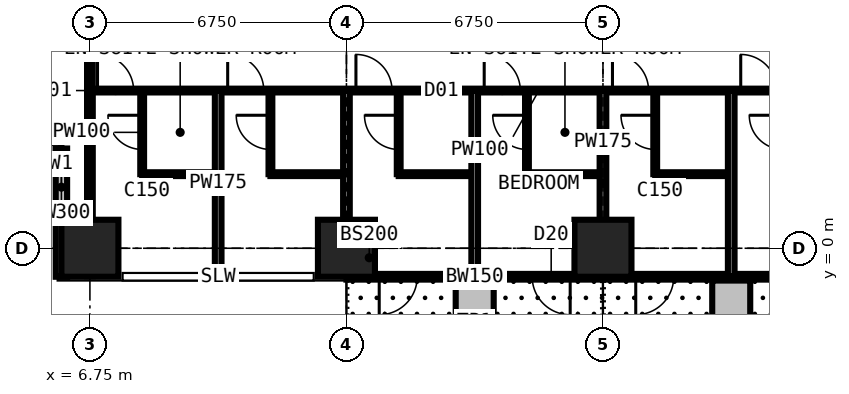
"""IFC4 building model, lengths in metres.
Left out: names, types, materials, properties, quantities, classifications, styles, units other than length and angle.
Written with IfcOpenShell. Run it as: python <this file> out.ifc"""

import sys

from ifc_helpers import new_model, si_unit, direction, frame, frame_2d, origin, origin_2d, place, context, subcontext, project, spatial, rectangle, extrude, element, fill, save


model = new_model("IFC4")
c1 = context("Model", 3, precision=1e-05, world=origin(), true_north=direction((0.0, 1.0)))
c2 = subcontext(c1, "Body", "Model", "MODEL_VIEW")
j1 = project(units=[si_unit("LENGTHUNIT", "METRE"), si_unit("PLANEANGLEUNIT", "RADIAN")], contexts=[c1])
p1 = place(None, origin())
s1 = spatial("IfcSite", under=j1, at=p1, CompositionType="ELEMENT")
p2 = place(p1, origin())
s2 = spatial("IfcBuilding", under=s1, at=p2, CompositionType="ELEMENT")
p3 = place(p2, frame((0.0, 0.0, 108.9)))
s3 = spatial("IfcBuildingStorey", under=s2, at=p3, CompositionType="ELEMENT", Elevation=108.9)
for number, where, z_axis, x_axis in (
    (1, (6.75, 0.0, 0.0), (0.0, 0.0, 1.0), (1.0, 0.0, 0.0)),
    (2, (13.5, 0.0, 0.0), (0.0, 0.0, 1.0), (1.0, 0.0, 0.0)),
    (3, (20.25, 0.0, 0.0), (0.0, 0.0, 1.0), (1.0, 0.0, 0.0)),
):
    element("IfcColumn", number, at=place(p3, frame(where, z_axis=z_axis, x_axis=x_axis)), inside=s3, PredefinedType="COLUMN", context=c2, shape_type="SweptSolid", body=[
        extrude(rectangle(XDim=1.5, YDim=1.5, at=origin_2d()), origin(), (0.0, 0.0, 1.0), 3.6),
    ])
p4 = place(p3, frame((2.625, 2.625, 0.0), z_axis=(0.0, 0.0, 1.0), x_axis=(1.0, 0.0, 0.0)))
e4 = element("IfcWall", 4, at=p4, inside=s3, PredefinedType="SOLIDWALL", context=c2, shape_type="SweptSolid", body=[
    extrude(rectangle(XDim=3.375, YDim=0.3, at=frame_2d((1.688, 0.0))), origin(), (0.0, 0.0, 1.0), 3.375),
])
p5 = place(p4, frame((0.788, 0.0, 0.6)))
e5 = element("IfcOpeningElement", 5, at=p5, cuts=e4, PredefinedType="OPENING", context=c2, shape_type="SweptSolid", body=[
    extrude(rectangle(XDim=1.8, YDim=2.1, at=frame_2d((0.9, 1.05))), frame((0.0, 0.16, 0.0), z_axis=(0.0, -1.0, 0.0), x_axis=(1.0, 0.0, 0.0)), (0.0, 0.0, 1.0), 0.32),
])
p6 = place(p3, frame((6.0, 2.625, 0.0), z_axis=(0.0, 0.0, 1.0), x_axis=(0.0, -1.0, 0.0)))
e6 = element("IfcWall", 6, at=p6, inside=s3, PredefinedType="SOLIDWALL", context=c2, shape_type="SweptSolid", body=[
    extrude(rectangle(XDim=3.375, YDim=0.3, at=frame_2d((1.688, 0.0))), origin(), (0.0, 0.0, 1.0), 3.375),
])
p7 = place(p6, frame((0.268, 0.0, 0.9)))
e7 = element("IfcOpeningElement", 7, at=p7, cuts=e6, PredefinedType="OPENING", context=c2, shape_type="SweptSolid", body=[
    extrude(rectangle(XDim=1.5, YDim=1.8, at=frame_2d((0.75, 0.9))), frame((0.0, 0.16, 0.0), z_axis=(0.0, -1.0, 0.0), x_axis=(1.0, 0.0, 0.0)), (0.0, 0.0, 1.0), 0.32),
])
p8 = place(p3, frame((20.25, -0.75, 0.0), z_axis=(0.0, 0.0, 1.0), x_axis=(-1.0, 0.0, 0.0)))
e8 = element("IfcWall", 8, at=p8, inside=s3, PredefinedType="SOLIDWALL", context=c2, shape_type="SweptSolid", body=[
    extrude(rectangle(XDim=6.75, YDim=0.15, at=frame_2d((3.375, 0.0))), origin(), (0.0, 0.0, 1.0), 3.375),
])
p9 = place(p8, frame((0.863, 0.0, 0.0)))
e9 = element("IfcOpeningElement", 9, at=p9, cuts=e8, PredefinedType="OPENING", context=c2, shape_type="SweptSolid", body=[
    extrude(rectangle(XDim=1.0, YDim=2.2, at=frame_2d((0.5, 1.1))), frame((0.0, 0.085, 0.0), z_axis=(0.0, -1.0, 0.0), x_axis=(1.0, 0.0, 0.0)), (0.0, 0.0, 1.0), 0.17),
])
p10 = place(p8, frame((1.975, 0.0, 0.9)))
e10 = element("IfcOpeningElement", 10, at=p10, cuts=e8, PredefinedType="OPENING", context=c2, shape_type="SweptSolid", body=[
    extrude(rectangle(XDim=1.2, YDim=1.8, at=frame_2d((0.6, 0.9))), frame((0.0, 0.085, 0.0), z_axis=(0.0, -1.0, 0.0), x_axis=(1.0, 0.0, 0.0)), (0.0, 0.0, 1.0), 0.17),
])
p11 = place(p8, frame((4.887, 0.0, 0.0)))
e11 = element("IfcOpeningElement", 11, at=p11, cuts=e8, PredefinedType="OPENING", context=c2, shape_type="SweptSolid", body=[
    extrude(rectangle(XDim=1.0, YDim=2.2, at=frame_2d((0.5, 1.1))), frame((0.0, 0.085, 0.0), z_axis=(0.0, -1.0, 0.0), x_axis=(1.0, 0.0, 0.0)), (0.0, 0.0, 1.0), 0.17),
])
p12 = place(p8, frame((3.575, 0.0, 0.9)))
e12 = element("IfcOpeningElement", 12, at=p12, cuts=e8, PredefinedType="OPENING", context=c2, shape_type="SweptSolid", body=[
    extrude(rectangle(XDim=1.2, YDim=1.8, at=frame_2d((0.6, 0.9))), frame((0.0, 0.085, 0.0), z_axis=(0.0, -1.0, 0.0), x_axis=(1.0, 0.0, 0.0)), (0.0, 0.0, 1.0), 0.17),
])
p13 = place(p3, frame((27.0, -0.75, 0.0), z_axis=(0.0, 0.0, 1.0), x_axis=(-1.0, 0.0, 0.0)))
e13 = element("IfcWall", 13, at=p13, inside=s3, PredefinedType="SOLIDWALL", context=c2, shape_type="SweptSolid", body=[
    extrude(rectangle(XDim=6.75, YDim=0.15, at=frame_2d((3.375, 0.0))), origin(), (0.0, 0.0, 1.0), 3.375),
])
p14 = place(p13, frame((0.863, 0.0, 0.0)))
e14 = element("IfcOpeningElement", 14, at=p14, cuts=e13, PredefinedType="OPENING", context=c2, shape_type="SweptSolid", body=[
    extrude(rectangle(XDim=1.0, YDim=2.2, at=frame_2d((0.5, 1.1))), frame((0.0, 0.085, 0.0), z_axis=(0.0, -1.0, 0.0), x_axis=(1.0, 0.0, 0.0)), (0.0, 0.0, 1.0), 0.17),
])
p15 = place(p13, frame((1.975, 0.0, 0.9)))
e15 = element("IfcOpeningElement", 15, at=p15, cuts=e13, PredefinedType="OPENING", context=c2, shape_type="SweptSolid", body=[
    extrude(rectangle(XDim=1.2, YDim=1.8, at=frame_2d((0.6, 0.9))), frame((0.0, 0.085, 0.0), z_axis=(0.0, -1.0, 0.0), x_axis=(1.0, 0.0, 0.0)), (0.0, 0.0, 1.0), 0.17),
])
p16 = place(p13, frame((4.887, 0.0, 0.0)))
e16 = element("IfcOpeningElement", 16, at=p16, cuts=e13, PredefinedType="OPENING", context=c2, shape_type="SweptSolid", body=[
    extrude(rectangle(XDim=1.0, YDim=2.2, at=frame_2d((0.5, 1.1))), frame((0.0, 0.085, 0.0), z_axis=(0.0, -1.0, 0.0), x_axis=(1.0, 0.0, 0.0)), (0.0, 0.0, 1.0), 0.17),
])
p17 = place(p13, frame((3.575, 0.0, 0.9)))
e17 = element("IfcOpeningElement", 17, at=p17, cuts=e13, PredefinedType="OPENING", context=c2, shape_type="SweptSolid", body=[
    extrude(rectangle(XDim=1.2, YDim=1.8, at=frame_2d((0.6, 0.9))), frame((0.0, 0.085, 0.0), z_axis=(0.0, -1.0, 0.0), x_axis=(1.0, 0.0, 0.0)), (0.0, 0.0, 1.0), 0.17),
])
for number, where, z_axis, x_axis in (
    (18, (16.875, -0.85, 0.0), (0.0, 0.0, 1.0), (0.0, -1.0, 0.0)),
    (19, (23.625, -0.85, 0.0), (0.0, 0.0, 1.0), (0.0, -1.0, 0.0)),
):
    element("IfcWall", number, at=place(p3, frame(where, z_axis=z_axis, x_axis=x_axis)), inside=s3, PredefinedType="USERDEFINED", context=c2, shape_type="SweptSolid", body=[
        extrude(rectangle(XDim=2.2, YDim=1.0, at=frame_2d((1.1, 0.0))), origin(), (0.0, 0.0, 1.0), 0.9),
    ])
p18 = place(p3, frame((6.75, -0.734, 0.0), z_axis=(0.0, 0.0, 1.0), x_axis=(0.0, 1.0, 0.0)))
e20 = element("IfcWall", 20, at=p18, inside=s3, PredefinedType="PARTITIONING", context=c2, shape_type="SweptSolid", body=[
    extrude(rectangle(XDim=10.859, YDim=0.15, at=frame_2d((5.429, 0.0))), origin(), (0.0, 0.0, 1.0), 2.877),
])
p19 = place(p3, frame((6.75, 4.15, 0.0), z_axis=(0.0, 0.0, 1.0), x_axis=(1.0, 0.0, 0.0)))
e21 = element("IfcWall", 21, at=p19, inside=s3, PredefinedType="PARTITIONING", context=c2, shape_type="SweptSolid", body=[
    extrude(rectangle(XDim=23.625, YDim=0.1, at=frame_2d((11.812, 0.0))), origin(), (0.0, 0.0, 1.0), 3.375),
])
p20 = place(p19, frame((0.2, 0.0, 0.0)))
e22 = element("IfcOpeningElement", 22, at=p20, cuts=e21, PredefinedType="OPENING", context=c2, shape_type="SweptSolid", body=[
    extrude(rectangle(XDim=0.95, YDim=2.2, at=frame_2d((0.475, 1.1))), frame((0.0, 0.06, 0.0), z_axis=(0.0, -1.0, 0.0), x_axis=(1.0, 0.0, 0.0)), (0.0, 0.0, 1.0), 0.12),
])
p21 = place(p19, frame((3.625, 0.0, 0.0)))
e23 = element("IfcOpeningElement", 23, at=p21, cuts=e21, PredefinedType="OPENING", context=c2, shape_type="SweptSolid", body=[
    extrude(rectangle(XDim=0.95, YDim=2.2, at=frame_2d((0.475, 1.1))), frame((0.0, 0.06, 0.0), z_axis=(0.0, -1.0, 0.0), x_axis=(1.0, 0.0, 0.0)), (0.0, 0.0, 1.0), 0.12),
])
p22 = place(p19, frame((7.0, 0.0, 0.0)))
e24 = element("IfcOpeningElement", 24, at=p22, cuts=e21, PredefinedType="OPENING", context=c2, shape_type="SweptSolid", body=[
    extrude(rectangle(XDim=0.95, YDim=2.2, at=frame_2d((0.475, 1.1))), frame((0.0, 0.06, 0.0), z_axis=(0.0, -1.0, 0.0), x_axis=(1.0, 0.0, 0.0)), (0.0, 0.0, 1.0), 0.12),
])
p23 = place(p19, frame((10.375, 0.0, 0.0)))
e25 = element("IfcOpeningElement", 25, at=p23, cuts=e21, PredefinedType="OPENING", context=c2, shape_type="SweptSolid", body=[
    extrude(rectangle(XDim=0.95, YDim=2.2, at=frame_2d((0.475, 1.1))), frame((0.0, 0.06, 0.0), z_axis=(0.0, -1.0, 0.0), x_axis=(1.0, 0.0, 0.0)), (0.0, 0.0, 1.0), 0.12),
])
p24 = place(p19, frame((13.75, 0.0, 0.0)))
e26 = element("IfcOpeningElement", 26, at=p24, cuts=e21, PredefinedType="OPENING", context=c2, shape_type="SweptSolid", body=[
    extrude(rectangle(XDim=0.95, YDim=2.2, at=frame_2d((0.475, 1.1))), frame((0.0, 0.06, 0.0), z_axis=(0.0, -1.0, 0.0), x_axis=(1.0, 0.0, 0.0)), (0.0, 0.0, 1.0), 0.12),
])
p25 = place(p19, frame((17.125, 0.0, 0.0)))
e27 = element("IfcOpeningElement", 27, at=p25, cuts=e21, PredefinedType="OPENING", context=c2, shape_type="SweptSolid", body=[
    extrude(rectangle(XDim=0.95, YDim=2.2, at=frame_2d((0.475, 1.1))), frame((0.0, 0.06, 0.0), z_axis=(0.0, -1.0, 0.0), x_axis=(1.0, 0.0, 0.0)), (0.0, 0.0, 1.0), 0.12),
])
p26 = place(p19, frame((20.5, 0.0, 0.0)))
e28 = element("IfcOpeningElement", 28, at=p26, cuts=e21, PredefinedType="OPENING", context=c2, shape_type="SweptSolid", body=[
    extrude(rectangle(XDim=0.95, YDim=2.2, at=frame_2d((0.475, 1.1))), frame((0.0, 0.06, 0.0), z_axis=(0.0, -1.0, 0.0), x_axis=(1.0, 0.0, 0.0)), (0.0, 0.0, 1.0), 0.12),
])
p27 = place(p3, frame((8.125, 1.95, 0.0), z_axis=(0.0, 0.0, 1.0), x_axis=(0.0, 1.0, 0.0)))
e29 = element("IfcWall", 29, at=p27, inside=s3, PredefinedType="PARTITIONING", context=c2, shape_type="SweptSolid", body=[
    extrude(rectangle(XDim=2.2, YDim=0.1, at=frame_2d((1.1, 0.0))), origin(), (0.0, 0.0, 1.0), 3.375),
])
p28 = place(p27, frame((0.65, 0.0, 0.0)))
e30 = element("IfcOpeningElement", 30, at=p28, cuts=e29, PredefinedType="OPENING", context=c2, shape_type="SweptSolid", body=[
    extrude(rectangle(XDim=0.9, YDim=2.2, at=frame_2d((0.45, 1.1))), frame((0.0, 0.06, 0.0), z_axis=(0.0, -1.0, 0.0), x_axis=(1.0, 0.0, 0.0)), (0.0, 0.0, 1.0), 0.12),
])
p29 = place(p3, frame((8.125, 1.95, 0.0), z_axis=(0.0, 0.0, 1.0), x_axis=(1.0, 0.0, 0.0)))
e31 = element("IfcWall", 31, at=p29, inside=s3, PredefinedType="PARTITIONING", context=c2, shape_type="SweptSolid", body=[
    extrude(rectangle(XDim=2.0, YDim=0.1, at=frame_2d((1.0, 0.0))), origin(), (0.0, 0.0, 1.0), 3.375),
])
p30 = place(p3, frame((10.125, -0.734, 0.0), z_axis=(0.0, 0.0, 1.0), x_axis=(0.0, 1.0, 0.0)))
e32 = element("IfcWall", 32, at=p30, inside=s3, PredefinedType="PARTITIONING", context=c2, shape_type="SweptSolid", body=[
    extrude(rectangle(XDim=4.884, YDim=0.175, at=frame_2d((2.442, 0.0))), origin(), (0.0, 0.0, 1.0), 3.375),
])
p31 = place(p3, frame((11.5, 1.95, 0.0), z_axis=(0.0, 0.0, 1.0), x_axis=(0.0, 1.0, 0.0)))
e33 = element("IfcWall", 33, at=p31, inside=s3, PredefinedType="PARTITIONING", context=c2, shape_type="SweptSolid", body=[
    extrude(rectangle(XDim=2.2, YDim=0.1, at=frame_2d((1.1, 0.0))), origin(), (0.0, 0.0, 1.0), 3.375),
])
p32 = place(p31, frame((0.65, 0.0, 0.0)))
e34 = element("IfcOpeningElement", 34, at=p32, cuts=e33, PredefinedType="OPENING", context=c2, shape_type="SweptSolid", body=[
    extrude(rectangle(XDim=0.9, YDim=2.2, at=frame_2d((0.45, 1.1))), frame((0.0, 0.06, 0.0), z_axis=(0.0, -1.0, 0.0), x_axis=(1.0, 0.0, 0.0)), (0.0, 0.0, 1.0), 0.12),
])
p33 = place(p3, frame((11.5, 1.95, 0.0), z_axis=(0.0, 0.0, 1.0), x_axis=(1.0, 0.0, 0.0)))
e35 = element("IfcWall", 35, at=p33, inside=s3, PredefinedType="PARTITIONING", context=c2, shape_type="SweptSolid", body=[
    extrude(rectangle(XDim=2.0, YDim=0.1, at=frame_2d((1.0, 0.0))), origin(), (0.0, 0.0, 1.0), 3.375),
])
p34 = place(p3, frame((13.5, -0.734, 0.0), z_axis=(0.0, 0.0, 1.0), x_axis=(0.0, 1.0, 0.0)))
e36 = element("IfcWall", 36, at=p34, inside=s3, PredefinedType="PARTITIONING", context=c2, shape_type="SweptSolid", body=[
    extrude(rectangle(XDim=4.884, YDim=0.175, at=frame_2d((2.442, 0.0))), origin(), (0.0, 0.0, 1.0), 2.877),
])
p35 = place(p3, frame((14.875, 1.95, 0.0), z_axis=(0.0, 0.0, 1.0), x_axis=(0.0, 1.0, 0.0)))
e37 = element("IfcWall", 37, at=p35, inside=s3, PredefinedType="PARTITIONING", context=c2, shape_type="SweptSolid", body=[
    extrude(rectangle(XDim=2.2, YDim=0.1, at=frame_2d((1.1, 0.0))), origin(), (0.0, 0.0, 1.0), 3.375),
])
p36 = place(p35, frame((0.65, 0.0, 0.0)))
e38 = element("IfcOpeningElement", 38, at=p36, cuts=e37, PredefinedType="OPENING", context=c2, shape_type="SweptSolid", body=[
    extrude(rectangle(XDim=0.9, YDim=2.2, at=frame_2d((0.45, 1.1))), frame((0.0, 0.06, 0.0), z_axis=(0.0, -1.0, 0.0), x_axis=(1.0, 0.0, 0.0)), (0.0, 0.0, 1.0), 0.12),
])
p37 = place(p3, frame((14.875, 1.95, 0.0), z_axis=(0.0, 0.0, 1.0), x_axis=(1.0, 0.0, 0.0)))
e39 = element("IfcWall", 39, at=p37, inside=s3, PredefinedType="PARTITIONING", context=c2, shape_type="SweptSolid", body=[
    extrude(rectangle(XDim=2.0, YDim=0.1, at=frame_2d((1.0, 0.0))), origin(), (0.0, 0.0, 1.0), 3.375),
])
p38 = place(p3, frame((16.875, -0.734, 0.0), z_axis=(0.0, 0.0, 1.0), x_axis=(0.0, 1.0, 0.0)))
e40 = element("IfcWall", 40, at=p38, inside=s3, PredefinedType="PARTITIONING", context=c2, shape_type="SweptSolid", body=[
    extrude(rectangle(XDim=4.884, YDim=0.175, at=frame_2d((2.442, 0.0))), origin(), (0.0, 0.0, 1.0), 3.375),
])
p39 = place(p3, frame((18.25, 1.95, 0.0), z_axis=(0.0, 0.0, 1.0), x_axis=(0.0, 1.0, 0.0)))
e41 = element("IfcWall", 41, at=p39, inside=s3, PredefinedType="PARTITIONING", context=c2, shape_type="SweptSolid", body=[
    extrude(rectangle(XDim=2.2, YDim=0.1, at=frame_2d((1.1, 0.0))), origin(), (0.0, 0.0, 1.0), 3.375),
])
p40 = place(p39, frame((0.65, 0.0, 0.0)))
e42 = element("IfcOpeningElement", 42, at=p40, cuts=e41, PredefinedType="OPENING", context=c2, shape_type="SweptSolid", body=[
    extrude(rectangle(XDim=0.9, YDim=2.2, at=frame_2d((0.45, 1.1))), frame((0.0, 0.06, 0.0), z_axis=(0.0, -1.0, 0.0), x_axis=(1.0, 0.0, 0.0)), (0.0, 0.0, 1.0), 0.12),
])
p41 = place(p3, frame((18.25, 1.95, 0.0), z_axis=(0.0, 0.0, 1.0), x_axis=(1.0, 0.0, 0.0)))
e43 = element("IfcWall", 43, at=p41, inside=s3, PredefinedType="PARTITIONING", context=c2, shape_type="SweptSolid", body=[
    extrude(rectangle(XDim=2.0, YDim=0.1, at=frame_2d((1.0, 0.0))), origin(), (0.0, 0.0, 1.0), 3.375),
])
p42 = place(p3, frame((20.25, -0.734, 0.0), z_axis=(0.0, 0.0, 1.0), x_axis=(0.0, 1.0, 0.0)))
e44 = element("IfcWall", 44, at=p42, inside=s3, PredefinedType="PARTITIONING", context=c2, shape_type="SweptSolid", body=[
    extrude(rectangle(XDim=4.884, YDim=0.175, at=frame_2d((2.442, 0.0))), origin(), (0.0, 0.0, 1.0), 2.61),
])
p43 = place(p3, frame((21.625, 1.95, 0.0), z_axis=(0.0, 0.0, 1.0), x_axis=(0.0, 1.0, 0.0)))
e45 = element("IfcWall", 45, at=p43, inside=s3, PredefinedType="PARTITIONING", context=c2, shape_type="SweptSolid", body=[
    extrude(rectangle(XDim=2.2, YDim=0.1, at=frame_2d((1.1, 0.0))), origin(), (0.0, 0.0, 1.0), 3.375),
])
p44 = place(p43, frame((0.65, 0.0, 0.0)))
e46 = element("IfcOpeningElement", 46, at=p44, cuts=e45, PredefinedType="OPENING", context=c2, shape_type="SweptSolid", body=[
    extrude(rectangle(XDim=0.9, YDim=2.2, at=frame_2d((0.45, 1.1))), frame((0.0, 0.06, 0.0), z_axis=(0.0, -1.0, 0.0), x_axis=(1.0, 0.0, 0.0)), (0.0, 0.0, 1.0), 0.12),
])
p45 = place(p3, frame((21.625, 1.95, 0.0), z_axis=(0.0, 0.0, 1.0), x_axis=(1.0, 0.0, 0.0)))
e47 = element("IfcWall", 47, at=p45, inside=s3, PredefinedType="PARTITIONING", context=c2, shape_type="SweptSolid", body=[
    extrude(rectangle(XDim=2.0, YDim=0.1, at=frame_2d((1.0, 0.0))), origin(), (0.0, 0.0, 1.0), 3.375),
])
p46 = place(p3, frame((23.625, -0.734, 0.0), z_axis=(0.0, 0.0, 1.0), x_axis=(0.0, 1.0, 0.0)))
e48 = element("IfcWall", 48, at=p46, inside=s3, PredefinedType="PARTITIONING", context=c2, shape_type="SweptSolid", body=[
    extrude(rectangle(XDim=4.884, YDim=0.175, at=frame_2d((2.442, 0.0))), origin(), (0.0, 0.0, 1.0), 3.375),
])
p47 = place(p7, origin())
e49 = element("IfcWindow", 49, at=p47, inside=s3, PartitioningType="SINGLE_PANEL", PredefinedType="WINDOW", context=c2, shape_type="SweptSolid", body=[
    extrude(rectangle(XDim=1.5, YDim=1.8, at=frame_2d((0.75, 0.9))), frame((0.0, 0.03, 0.0), z_axis=(0.0, -1.0, 0.0), x_axis=(1.0, 0.0, 0.0)), (0.0, 0.0, 1.0), 0.06),
])
fill(e7, e49)
p48 = place(p9, origin())
e50 = element("IfcDoor", 50, at=p48, inside=s3, OperationType="SINGLE_SWING_LEFT", PredefinedType="DOOR", context=c2, shape_type="SweptSolid", body=[
    extrude(rectangle(XDim=1.0, YDim=2.2, at=frame_2d((0.5, 1.1))), frame((0.0, 0.025, 0.0), z_axis=(0.0, -1.0, 0.0), x_axis=(1.0, 0.0, 0.0)), (0.0, 0.0, 1.0), 0.05),
])
fill(e9, e50)
p49 = place(p10, origin())
e51 = element("IfcWindow", 51, at=p49, inside=s3, PartitioningType="SINGLE_PANEL", PredefinedType="WINDOW", context=c2, shape_type="SweptSolid", body=[
    extrude(rectangle(XDim=1.2, YDim=1.8, at=frame_2d((0.6, 0.9))), frame((0.0, 0.03, 0.0), z_axis=(0.0, -1.0, 0.0), x_axis=(1.0, 0.0, 0.0)), (0.0, 0.0, 1.0), 0.06),
])
fill(e10, e51)
p50 = place(p11, origin())
e52 = element("IfcDoor", 52, at=p50, inside=s3, OperationType="SINGLE_SWING_RIGHT", PredefinedType="DOOR", context=c2, shape_type="SweptSolid", body=[
    extrude(rectangle(XDim=1.0, YDim=2.2, at=frame_2d((0.5, 1.1))), frame((0.0, 0.025, 0.0), z_axis=(0.0, -1.0, 0.0), x_axis=(1.0, 0.0, 0.0)), (0.0, 0.0, 1.0), 0.05),
])
fill(e11, e52)
p51 = place(p12, origin())
e53 = element("IfcWindow", 53, at=p51, inside=s3, PartitioningType="SINGLE_PANEL", PredefinedType="WINDOW", context=c2, shape_type="SweptSolid", body=[
    extrude(rectangle(XDim=1.2, YDim=1.8, at=frame_2d((0.6, 0.9))), frame((0.0, 0.03, 0.0), z_axis=(0.0, -1.0, 0.0), x_axis=(1.0, 0.0, 0.0)), (0.0, 0.0, 1.0), 0.06),
])
fill(e12, e53)
p52 = place(p15, origin())
e54 = element("IfcWindow", 54, at=p52, inside=s3, PartitioningType="SINGLE_PANEL", PredefinedType="WINDOW", context=c2, shape_type="SweptSolid", body=[
    extrude(rectangle(XDim=1.2, YDim=1.8, at=frame_2d((0.6, 0.9))), frame((0.0, 0.03, 0.0), z_axis=(0.0, -1.0, 0.0), x_axis=(1.0, 0.0, 0.0)), (0.0, 0.0, 1.0), 0.06),
])
fill(e15, e54)
p53 = place(p16, origin())
e55 = element("IfcDoor", 55, at=p53, inside=s3, OperationType="SINGLE_SWING_RIGHT", PredefinedType="DOOR", context=c2, shape_type="SweptSolid", body=[
    extrude(rectangle(XDim=1.0, YDim=2.2, at=frame_2d((0.5, 1.1))), frame((0.0, 0.025, 0.0), z_axis=(0.0, -1.0, 0.0), x_axis=(1.0, 0.0, 0.0)), (0.0, 0.0, 1.0), 0.05),
])
fill(e16, e55)
p54 = place(p17, origin())
e56 = element("IfcWindow", 56, at=p54, inside=s3, PartitioningType="SINGLE_PANEL", PredefinedType="WINDOW", context=c2, shape_type="SweptSolid", body=[
    extrude(rectangle(XDim=1.2, YDim=1.8, at=frame_2d((0.6, 0.9))), frame((0.0, 0.03, 0.0), z_axis=(0.0, -1.0, 0.0), x_axis=(1.0, 0.0, 0.0)), (0.0, 0.0, 1.0), 0.06),
])
fill(e17, e56)
p55 = place(p20, origin())
e57 = element("IfcDoor", 57, at=p55, inside=s3, OperationType="SINGLE_SWING_LEFT", PredefinedType="DOOR", context=c2, shape_type="SweptSolid", body=[
    extrude(rectangle(XDim=0.95, YDim=2.2, at=frame_2d((0.475, 1.1))), frame((0.0, 0.025, 0.0), z_axis=(0.0, -1.0, 0.0), x_axis=(1.0, 0.0, 0.0)), (0.0, 0.0, 1.0), 0.05),
])
fill(e22, e57)
p56 = place(p28, origin())
e58 = element("IfcDoor", 58, at=p56, inside=s3, OperationType="SINGLE_SWING_RIGHT", PredefinedType="DOOR", context=c2, shape_type="SweptSolid", body=[
    extrude(rectangle(XDim=0.9, YDim=2.2, at=frame_2d((0.45, 1.1))), frame((0.0, 0.025, 0.0), z_axis=(0.0, -1.0, 0.0), x_axis=(1.0, 0.0, 0.0)), (0.0, 0.0, 1.0), 0.05),
])
fill(e30, e58)
p57 = place(p21, origin())
e59 = element("IfcDoor", 59, at=p57, inside=s3, OperationType="SINGLE_SWING_LEFT", PredefinedType="DOOR", context=c2, shape_type="SweptSolid", body=[
    extrude(rectangle(XDim=0.95, YDim=2.2, at=frame_2d((0.475, 1.1))), frame((0.0, 0.025, 0.0), z_axis=(0.0, -1.0, 0.0), x_axis=(1.0, 0.0, 0.0)), (0.0, 0.0, 1.0), 0.05),
])
fill(e23, e59)
p58 = place(p32, origin())
e60 = element("IfcDoor", 60, at=p58, inside=s3, OperationType="SINGLE_SWING_RIGHT", PredefinedType="DOOR", context=c2, shape_type="SweptSolid", body=[
    extrude(rectangle(XDim=0.9, YDim=2.2, at=frame_2d((0.45, 1.1))), frame((0.0, 0.025, 0.0), z_axis=(0.0, -1.0, 0.0), x_axis=(1.0, 0.0, 0.0)), (0.0, 0.0, 1.0), 0.05),
])
fill(e34, e60)
p59 = place(p22, origin())
e61 = element("IfcDoor", 61, at=p59, inside=s3, OperationType="SINGLE_SWING_LEFT", PredefinedType="DOOR", context=c2, shape_type="SweptSolid", body=[
    extrude(rectangle(XDim=0.95, YDim=2.2, at=frame_2d((0.475, 1.1))), frame((0.0, 0.025, 0.0), z_axis=(0.0, -1.0, 0.0), x_axis=(1.0, 0.0, 0.0)), (0.0, 0.0, 1.0), 0.05),
])
fill(e24, e61)
p60 = place(p36, origin())
e62 = element("IfcDoor", 62, at=p60, inside=s3, OperationType="SINGLE_SWING_RIGHT", PredefinedType="DOOR", context=c2, shape_type="SweptSolid", body=[
    extrude(rectangle(XDim=0.9, YDim=2.2, at=frame_2d((0.45, 1.1))), frame((0.0, 0.025, 0.0), z_axis=(0.0, -1.0, 0.0), x_axis=(1.0, 0.0, 0.0)), (0.0, 0.0, 1.0), 0.05),
])
fill(e38, e62)
p61 = place(p23, origin())
e63 = element("IfcDoor", 63, at=p61, inside=s3, OperationType="SINGLE_SWING_LEFT", PredefinedType="DOOR", context=c2, shape_type="SweptSolid", body=[
    extrude(rectangle(XDim=0.95, YDim=2.2, at=frame_2d((0.475, 1.1))), frame((0.0, 0.025, 0.0), z_axis=(0.0, -1.0, 0.0), x_axis=(1.0, 0.0, 0.0)), (0.0, 0.0, 1.0), 0.05),
])
fill(e25, e63)
p62 = place(p40, origin())
e64 = element("IfcDoor", 64, at=p62, inside=s3, OperationType="SINGLE_SWING_RIGHT", PredefinedType="DOOR", context=c2, shape_type="SweptSolid", body=[
    extrude(rectangle(XDim=0.9, YDim=2.2, at=frame_2d((0.45, 1.1))), frame((0.0, 0.025, 0.0), z_axis=(0.0, -1.0, 0.0), x_axis=(1.0, 0.0, 0.0)), (0.0, 0.0, 1.0), 0.05),
])
fill(e42, e64)
p63 = place(p24, origin())
e65 = element("IfcDoor", 65, at=p63, inside=s3, OperationType="SINGLE_SWING_LEFT", PredefinedType="DOOR", context=c2, shape_type="SweptSolid", body=[
    extrude(rectangle(XDim=0.95, YDim=2.2, at=frame_2d((0.475, 1.1))), frame((0.0, 0.025, 0.0), z_axis=(0.0, -1.0, 0.0), x_axis=(1.0, 0.0, 0.0)), (0.0, 0.0, 1.0), 0.05),
])
fill(e26, e65)
p64 = place(p44, origin())
e66 = element("IfcDoor", 66, at=p64, inside=s3, OperationType="SINGLE_SWING_RIGHT", PredefinedType="DOOR", context=c2, shape_type="SweptSolid", body=[
    extrude(rectangle(XDim=0.9, YDim=2.2, at=frame_2d((0.45, 1.1))), frame((0.0, 0.025, 0.0), z_axis=(0.0, -1.0, 0.0), x_axis=(1.0, 0.0, 0.0)), (0.0, 0.0, 1.0), 0.05),
])
fill(e46, e66)
p65 = place(p25, origin())
e67 = element("IfcDoor", 67, at=p65, inside=s3, OperationType="SINGLE_SWING_LEFT", PredefinedType="DOOR", context=c2, shape_type="SweptSolid", body=[
    extrude(rectangle(XDim=0.95, YDim=2.2, at=frame_2d((0.475, 1.1))), frame((0.0, 0.025, 0.0), z_axis=(0.0, -1.0, 0.0), x_axis=(1.0, 0.0, 0.0)), (0.0, 0.0, 1.0), 0.05),
])
fill(e27, e67)
save(model, sys.argv[1])
